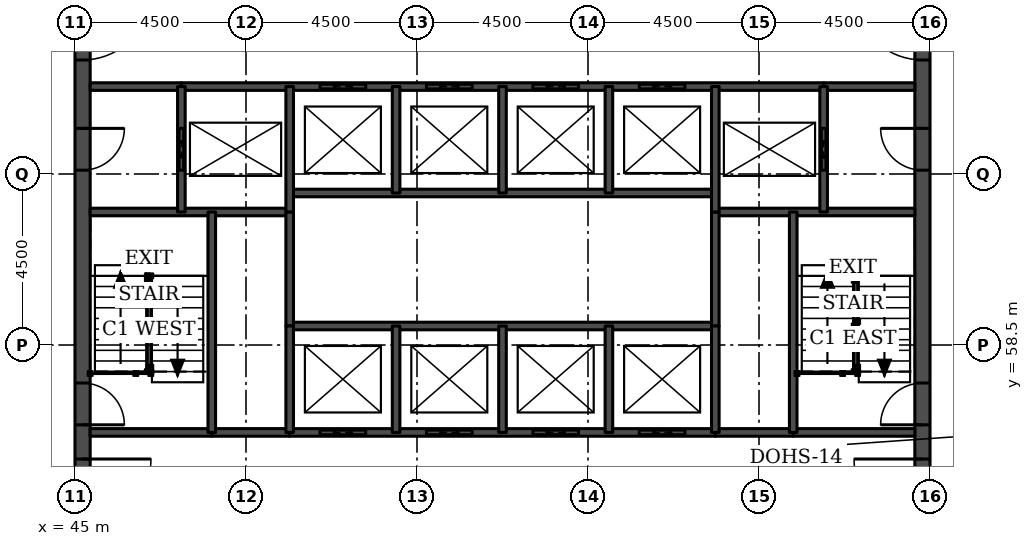
"""IFC4 building model, lengths in metres.
Left out: names, types, materials, properties, quantities, classifications, styles, units other than length and angle.
Written with IfcOpenShell. Run it as: python <this file> out.ifc"""

import sys

from ifc_helpers import new_model, si_unit, direction, frame, frame_2d, origin, place, context, subcontext, project, spatial, rectangle, extrude, element, fill, save


model = new_model("IFC4")
c1 = context("Model", 3, precision=1e-05, world=origin(), true_north=direction((0.0, 1.0)))
c2 = subcontext(c1, "Body", "Model", "MODEL_VIEW")
j1 = project(units=[si_unit("LENGTHUNIT", "METRE"), si_unit("PLANEANGLEUNIT", "RADIAN")], contexts=[c1])
p1 = place(None, origin())
s1 = spatial("IfcSite", under=j1, at=p1, CompositionType="ELEMENT")
p2 = place(p1, origin())
s2 = spatial("IfcBuilding", under=s1, at=p2, CompositionType="ELEMENT")
p3 = place(p2, frame((0.0, 0.0, 260.0)))
s3 = spatial("IfcBuildingStorey", under=s2, at=p3, CompositionType="ELEMENT", Elevation=260.0)
p4 = place(p3, frame((45.2, 49.5, 0.0), z_axis=(0.0, 0.0, 1.0), x_axis=(0.0, 1.0, 0.0)))
e1 = element("IfcWall", 1, at=p4, inside=s3, PredefinedType="SHEAR", context=c2, shape_type="SweptSolid", body=[
    extrude(rectangle(XDim=22.5, YDim=0.4, at=frame_2d((11.25, 0.0))), origin(), (0.0, 0.0, 1.0), 3.7),
])
p5 = place(p4, frame((4.2, 0.0, 0.0)))
e2 = element("IfcOpeningElement", 2, at=p5, cuts=e1, PredefinedType="OPENING", context=c2, shape_type="SweptSolid", body=[
    extrude(rectangle(XDim=1.8, YDim=2.1, at=frame_2d((0.9, 1.05))), frame((0.0, 0.21, 0.0), z_axis=(0.0, -1.0, 0.0), x_axis=(1.0, 0.0, 0.0)), (0.0, 0.0, 1.0), 0.42),
])
p6 = place(p4, frame((6.9, 0.0, 0.0)))
e3 = element("IfcOpeningElement", 3, at=p6, cuts=e1, PredefinedType="OPENING", context=c2, shape_type="SweptSolid", body=[
    extrude(rectangle(XDim=1.1, YDim=2.1, at=frame_2d((0.55, 1.05))), frame((0.0, 0.21, 0.0), z_axis=(0.0, -1.0, 0.0), x_axis=(1.0, 0.0, 0.0)), (0.0, 0.0, 1.0), 0.42),
])
p7 = place(p4, frame((13.6, 0.0, 0.0)))
e4 = element("IfcOpeningElement", 4, at=p7, cuts=e1, PredefinedType="OPENING", context=c2, shape_type="SweptSolid", body=[
    extrude(rectangle(XDim=1.1, YDim=2.1, at=frame_2d((0.55, 1.05))), frame((0.0, 0.21, 0.0), z_axis=(0.0, -1.0, 0.0), x_axis=(1.0, 0.0, 0.0)), (0.0, 0.0, 1.0), 0.42),
])
p8 = place(p4, frame((16.5, 0.0, 0.0)))
e5 = element("IfcOpeningElement", 5, at=p8, cuts=e1, PredefinedType="OPENING", context=c2, shape_type="SweptSolid", body=[
    extrude(rectangle(XDim=1.8, YDim=2.1, at=frame_2d((0.9, 1.05))), frame((0.0, 0.21, 0.0), z_axis=(0.0, -1.0, 0.0), x_axis=(1.0, 0.0, 0.0)), (0.0, 0.0, 1.0), 0.42),
])
p9 = place(p3, frame((67.3, 49.5, 0.0), z_axis=(0.0, 0.0, 1.0), x_axis=(0.0, 1.0, 0.0)))
e6 = element("IfcWall", 6, at=p9, inside=s3, PredefinedType="SHEAR", context=c2, shape_type="SweptSolid", body=[
    extrude(rectangle(XDim=22.5, YDim=0.4, at=frame_2d((11.25, 0.0))), origin(), (0.0, 0.0, 1.0), 3.7),
])
p10 = place(p9, frame((4.2, 0.0, 0.0)))
e7 = element("IfcOpeningElement", 7, at=p10, cuts=e6, PredefinedType="OPENING", context=c2, shape_type="SweptSolid", body=[
    extrude(rectangle(XDim=1.8, YDim=2.1, at=frame_2d((0.9, 1.05))), frame((0.0, 0.21, 0.0), z_axis=(0.0, -1.0, 0.0), x_axis=(1.0, 0.0, 0.0)), (0.0, 0.0, 1.0), 0.42),
])
p11 = place(p9, frame((6.9, 0.0, 0.0)))
e8 = element("IfcOpeningElement", 8, at=p11, cuts=e6, PredefinedType="OPENING", context=c2, shape_type="SweptSolid", body=[
    extrude(rectangle(XDim=1.1, YDim=2.1, at=frame_2d((0.55, 1.05))), frame((0.0, 0.21, 0.0), z_axis=(0.0, -1.0, 0.0), x_axis=(1.0, 0.0, 0.0)), (0.0, 0.0, 1.0), 0.42),
])
p12 = place(p9, frame((13.6, 0.0, 0.0)))
e9 = element("IfcOpeningElement", 9, at=p12, cuts=e6, PredefinedType="OPENING", context=c2, shape_type="SweptSolid", body=[
    extrude(rectangle(XDim=1.1, YDim=2.1, at=frame_2d((0.55, 1.05))), frame((0.0, 0.21, 0.0), z_axis=(0.0, -1.0, 0.0), x_axis=(1.0, 0.0, 0.0)), (0.0, 0.0, 1.0), 0.42),
])
p13 = place(p9, frame((16.5, 0.0, 0.0)))
e10 = element("IfcOpeningElement", 10, at=p13, cuts=e6, PredefinedType="OPENING", context=c2, shape_type="SweptSolid", body=[
    extrude(rectangle(XDim=1.8, YDim=2.1, at=frame_2d((0.9, 1.05))), frame((0.0, 0.21, 0.0), z_axis=(0.0, -1.0, 0.0), x_axis=(1.0, 0.0, 0.0)), (0.0, 0.0, 1.0), 0.42),
])
for number, where, z_axis, x_axis in (
    (11, (48.6, 56.2, 0.0), (0.0, 0.0, 1.0), (1.0, 0.0, 0.0)),
    (12, (61.85, 56.2, 0.0), (0.0, 0.0, 1.0), (1.0, 0.0, 0.0)),
):
    element("IfcWall", number, at=place(p3, frame(where, z_axis=z_axis, x_axis=x_axis)), inside=s3, PredefinedType="SOLIDWALL", context=c2, shape_type="SweptSolid", body=[
        extrude(rectangle(XDim=2.05, YDim=0.2, at=frame_2d((1.025, 0.0))), origin(), (0.0, 0.0, 1.0), 3.45),
    ])
p14 = place(p3, frame((45.4, 56.2, 0.0), z_axis=(0.0, 0.0, 1.0), x_axis=(1.0, 0.0, 0.0)))
e13 = element("IfcWall", 13, at=p14, inside=s3, PredefinedType="SOLIDWALL", context=c2, shape_type="SweptSolid", body=[
    extrude(rectangle(XDim=3.2, YDim=0.2, at=frame_2d((1.6, 0.0))), origin(), (0.0, 0.0, 1.0), 3.45),
])
p15 = place(p3, frame((50.65, 56.2, 0.0), z_axis=(0.0, 0.0, 1.0), x_axis=(1.0, 0.0, 0.0)))
e14 = element("IfcWall", 14, at=p15, inside=s3, PredefinedType="SOLIDWALL", context=c2, shape_type="SweptSolid", body=[
    extrude(rectangle(XDim=11.2, YDim=0.2, at=frame_2d((5.6, 0.0))), origin(), (0.0, 0.0, 1.0), 3.45),
])
p16 = place(p15, frame((0.8, 0.0, 0.0)))
e15 = element("IfcOpeningElement", 15, at=p16, cuts=e14, PredefinedType="OPENING", context=c2, shape_type="SweptSolid", body=[
    extrude(rectangle(XDim=1.2, YDim=2.1, at=frame_2d((0.6, 1.05))), frame((0.0, 0.11, 0.0), z_axis=(0.0, -1.0, 0.0), x_axis=(1.0, 0.0, 0.0)), (0.0, 0.0, 1.0), 0.22),
])
p17 = place(p15, frame((3.6, 0.0, 0.0)))
e16 = element("IfcOpeningElement", 16, at=p17, cuts=e14, PredefinedType="OPENING", context=c2, shape_type="SweptSolid", body=[
    extrude(rectangle(XDim=1.2, YDim=2.1, at=frame_2d((0.6, 1.05))), frame((0.0, 0.11, 0.0), z_axis=(0.0, -1.0, 0.0), x_axis=(1.0, 0.0, 0.0)), (0.0, 0.0, 1.0), 0.22),
])
p18 = place(p15, frame((6.4, 0.0, 0.0)))
e17 = element("IfcOpeningElement", 17, at=p18, cuts=e14, PredefinedType="OPENING", context=c2, shape_type="SweptSolid", body=[
    extrude(rectangle(XDim=1.2, YDim=2.1, at=frame_2d((0.6, 1.05))), frame((0.0, 0.11, 0.0), z_axis=(0.0, -1.0, 0.0), x_axis=(1.0, 0.0, 0.0)), (0.0, 0.0, 1.0), 0.22),
])
p19 = place(p15, frame((9.2, 0.0, 0.0)))
e18 = element("IfcOpeningElement", 18, at=p19, cuts=e14, PredefinedType="OPENING", context=c2, shape_type="SweptSolid", body=[
    extrude(rectangle(XDim=1.2, YDim=2.1, at=frame_2d((0.6, 1.05))), frame((0.0, 0.11, 0.0), z_axis=(0.0, -1.0, 0.0), x_axis=(1.0, 0.0, 0.0)), (0.0, 0.0, 1.0), 0.22),
])
p20 = place(p3, frame((63.9, 56.2, 0.0), z_axis=(0.0, 0.0, 1.0), x_axis=(1.0, 0.0, 0.0)))
e19 = element("IfcWall", 19, at=p20, inside=s3, PredefinedType="SOLIDWALL", context=c2, shape_type="SweptSolid", body=[
    extrude(rectangle(XDim=3.2, YDim=0.2, at=frame_2d((1.6, 0.0))), origin(), (0.0, 0.0, 1.0), 3.45),
])
p21 = place(p3, frame((50.65, 59.0, 0.0), z_axis=(0.0, 0.0, 1.0), x_axis=(1.0, 0.0, 0.0)))
e20 = element("IfcWall", 20, at=p21, inside=s3, PredefinedType="SOLIDWALL", context=c2, shape_type="SweptSolid", body=[
    extrude(rectangle(XDim=11.2, YDim=0.2, at=frame_2d((5.6, 0.0))), origin(), (0.0, 0.0, 1.0), 3.7),
])
for number, where, z_axis, x_axis in (
    (21, (45.4, 62.0, 0.0), (0.0, 0.0, 1.0), (1.0, 0.0, 0.0)),
    (22, (61.85, 62.0, 0.0), (0.0, 0.0, 1.0), (1.0, 0.0, 0.0)),
):
    element("IfcWall", number, at=place(p3, frame(where, z_axis=z_axis, x_axis=x_axis)), inside=s3, PredefinedType="SOLIDWALL", context=c2, shape_type="SweptSolid", body=[
        extrude(rectangle(XDim=5.25, YDim=0.2, at=frame_2d((2.625, 0.0))), origin(), (0.0, 0.0, 1.0), 3.45),
    ])
p22 = place(p3, frame((50.65, 62.5, 0.0), z_axis=(0.0, 0.0, 1.0), x_axis=(1.0, 0.0, 0.0)))
e23 = element("IfcWall", 23, at=p22, inside=s3, PredefinedType="SOLIDWALL", context=c2, shape_type="SweptSolid", body=[
    extrude(rectangle(XDim=11.2, YDim=0.2, at=frame_2d((5.6, 0.0))), origin(), (0.0, 0.0, 1.0), 3.7),
])
for number, where, z_axis, x_axis in (
    (24, (45.4, 65.3, 0.0), (0.0, 0.0, 1.0), (1.0, 0.0, 0.0)),
    (25, (64.7, 65.3, 0.0), (0.0, 0.0, 1.0), (1.0, 0.0, 0.0)),
):
    element("IfcWall", number, at=place(p3, frame(where, z_axis=z_axis, x_axis=x_axis)), inside=s3, PredefinedType="SOLIDWALL", context=c2, shape_type="SweptSolid", body=[
        extrude(rectangle(XDim=2.4, YDim=0.2, at=frame_2d((1.2, 0.0))), origin(), (0.0, 0.0, 1.0), 3.45),
    ])
p23 = place(p3, frame((47.8, 65.3, 0.0), z_axis=(0.0, 0.0, 1.0), x_axis=(1.0, 0.0, 0.0)))
e26 = element("IfcWall", 26, at=p23, inside=s3, PredefinedType="SOLIDWALL", context=c2, shape_type="SweptSolid", body=[
    extrude(rectangle(XDim=16.9, YDim=0.2, at=frame_2d((8.45, 0.0))), origin(), (0.0, 0.0, 1.0), 3.45),
])
p24 = place(p23, frame((3.65, 0.0, 0.0)))
e27 = element("IfcOpeningElement", 27, at=p24, cuts=e26, PredefinedType="OPENING", context=c2, shape_type="SweptSolid", body=[
    extrude(rectangle(XDim=1.2, YDim=2.1, at=frame_2d((0.6, 1.05))), frame((0.0, 0.11, 0.0), z_axis=(0.0, -1.0, 0.0), x_axis=(1.0, 0.0, 0.0)), (0.0, 0.0, 1.0), 0.22),
])
p25 = place(p23, frame((6.45, 0.0, 0.0)))
e28 = element("IfcOpeningElement", 28, at=p25, cuts=e26, PredefinedType="OPENING", context=c2, shape_type="SweptSolid", body=[
    extrude(rectangle(XDim=1.2, YDim=2.1, at=frame_2d((0.6, 1.05))), frame((0.0, 0.11, 0.0), z_axis=(0.0, -1.0, 0.0), x_axis=(1.0, 0.0, 0.0)), (0.0, 0.0, 1.0), 0.22),
])
p26 = place(p23, frame((9.25, 0.0, 0.0)))
e29 = element("IfcOpeningElement", 29, at=p26, cuts=e26, PredefinedType="OPENING", context=c2, shape_type="SweptSolid", body=[
    extrude(rectangle(XDim=1.2, YDim=2.1, at=frame_2d((0.6, 1.05))), frame((0.0, 0.11, 0.0), z_axis=(0.0, -1.0, 0.0), x_axis=(1.0, 0.0, 0.0)), (0.0, 0.0, 1.0), 0.22),
])
p27 = place(p23, frame((12.05, 0.0, 0.0)))
e30 = element("IfcOpeningElement", 30, at=p27, cuts=e26, PredefinedType="OPENING", context=c2, shape_type="SweptSolid", body=[
    extrude(rectangle(XDim=1.2, YDim=2.1, at=frame_2d((0.6, 1.05))), frame((0.0, 0.11, 0.0), z_axis=(0.0, -1.0, 0.0), x_axis=(1.0, 0.0, 0.0)), (0.0, 0.0, 1.0), 0.22),
])
p28 = place(p3, frame((47.8, 62.0, 0.0), z_axis=(0.0, 0.0, 1.0), x_axis=(0.0, 1.0, 0.0)))
e31 = element("IfcWall", 31, at=p28, inside=s3, PredefinedType="SOLIDWALL", context=c2, shape_type="SweptSolid", body=[
    extrude(rectangle(XDim=3.3, YDim=0.2, at=frame_2d((1.65, 0.0))), origin(), (0.0, 0.0, 1.0), 3.45),
])
p29 = place(p28, frame((1.1, 0.0, 0.0)))
e32 = element("IfcOpeningElement", 32, at=p29, cuts=e31, PredefinedType="OPENING", context=c2, shape_type="SweptSolid", body=[
    extrude(rectangle(XDim=1.1, YDim=2.1, at=frame_2d((0.55, 1.05))), frame((0.0, 0.11, 0.0), z_axis=(0.0, -1.0, 0.0), x_axis=(1.0, 0.0, 0.0)), (0.0, 0.0, 1.0), 0.22),
])
p30 = place(p3, frame((48.6, 56.2, 0.0), z_axis=(0.0, 0.0, 1.0), x_axis=(0.0, 1.0, 0.0)))
e33 = element("IfcWall", 33, at=p30, inside=s3, PredefinedType="SOLIDWALL", context=c2, shape_type="SweptSolid", body=[
    extrude(rectangle(XDim=5.8, YDim=0.2, at=frame_2d((2.9, 0.0))), origin(), (0.0, 0.0, 1.0), 3.45),
])
p31 = place(p3, frame((50.65, 59.0, 0.0), z_axis=(0.0, 0.0, 1.0), x_axis=(0.0, 1.0, 0.0)))
e34 = element("IfcWall", 34, at=p31, inside=s3, PredefinedType="SOLIDWALL", context=c2, shape_type="SweptSolid", body=[
    extrude(rectangle(XDim=3.0, YDim=0.2, at=frame_2d((1.5, 0.0))), origin(), (0.0, 0.0, 1.0), 3.7),
])
p32 = place(p3, frame((50.65, 56.2, 0.0), z_axis=(0.0, 0.0, 1.0), x_axis=(0.0, 1.0, 0.0)))
e35 = element("IfcWall", 35, at=p32, inside=s3, PredefinedType="SOLIDWALL", context=c2, shape_type="SweptSolid", body=[
    extrude(rectangle(XDim=2.8, YDim=0.2, at=frame_2d((1.4, 0.0))), origin(), (0.0, 0.0, 1.0), 3.45),
])
p33 = place(p3, frame((50.65, 62.0, 0.0), z_axis=(0.0, 0.0, 1.0), x_axis=(0.0, 1.0, 0.0)))
e36 = element("IfcWall", 36, at=p33, inside=s3, PredefinedType="SOLIDWALL", context=c2, shape_type="SweptSolid", body=[
    extrude(rectangle(XDim=3.3, YDim=0.2, at=frame_2d((1.65, 0.0))), origin(), (0.0, 0.0, 1.0), 3.45),
])
for number, where, z_axis, x_axis in (
    (37, (53.45, 56.2, 0.0), (0.0, 0.0, 1.0), (0.0, 1.0, 0.0)),
    (38, (53.45, 62.5, 0.0), (0.0, 0.0, 1.0), (0.0, 1.0, 0.0)),
    (39, (56.25, 56.2, 0.0), (0.0, 0.0, 1.0), (0.0, 1.0, 0.0)),
    (40, (56.25, 62.5, 0.0), (0.0, 0.0, 1.0), (0.0, 1.0, 0.0)),
    (41, (59.05, 56.2, 0.0), (0.0, 0.0, 1.0), (0.0, 1.0, 0.0)),
    (42, (59.05, 62.5, 0.0), (0.0, 0.0, 1.0), (0.0, 1.0, 0.0)),
):
    element("IfcWall", number, at=place(p3, frame(where, z_axis=z_axis, x_axis=x_axis)), inside=s3, PredefinedType="SOLIDWALL", context=c2, shape_type="SweptSolid", body=[
        extrude(rectangle(XDim=2.8, YDim=0.2, at=frame_2d((1.4, 0.0))), origin(), (0.0, 0.0, 1.0), 3.45),
    ])
p34 = place(p3, frame((61.85, 59.0, 0.0), z_axis=(0.0, 0.0, 1.0), x_axis=(0.0, 1.0, 0.0)))
e43 = element("IfcWall", 43, at=p34, inside=s3, PredefinedType="SOLIDWALL", context=c2, shape_type="SweptSolid", body=[
    extrude(rectangle(XDim=3.0, YDim=0.2, at=frame_2d((1.5, 0.0))), origin(), (0.0, 0.0, 1.0), 3.7),
])
p35 = place(p3, frame((61.85, 56.2, 0.0), z_axis=(0.0, 0.0, 1.0), x_axis=(0.0, 1.0, 0.0)))
e44 = element("IfcWall", 44, at=p35, inside=s3, PredefinedType="SOLIDWALL", context=c2, shape_type="SweptSolid", body=[
    extrude(rectangle(XDim=2.8, YDim=0.2, at=frame_2d((1.4, 0.0))), origin(), (0.0, 0.0, 1.0), 3.45),
])
p36 = place(p3, frame((61.85, 62.0, 0.0), z_axis=(0.0, 0.0, 1.0), x_axis=(0.0, 1.0, 0.0)))
e45 = element("IfcWall", 45, at=p36, inside=s3, PredefinedType="SOLIDWALL", context=c2, shape_type="SweptSolid", body=[
    extrude(rectangle(XDim=3.3, YDim=0.2, at=frame_2d((1.65, 0.0))), origin(), (0.0, 0.0, 1.0), 3.45),
])
p37 = place(p3, frame((63.9, 56.2, 0.0), z_axis=(0.0, 0.0, 1.0), x_axis=(0.0, 1.0, 0.0)))
e46 = element("IfcWall", 46, at=p37, inside=s3, PredefinedType="SOLIDWALL", context=c2, shape_type="SweptSolid", body=[
    extrude(rectangle(XDim=5.8, YDim=0.2, at=frame_2d((2.9, 0.0))), origin(), (0.0, 0.0, 1.0), 3.45),
])
p38 = place(p3, frame((64.7, 62.0, 0.0), z_axis=(0.0, 0.0, 1.0), x_axis=(0.0, 1.0, 0.0)))
e47 = element("IfcWall", 47, at=p38, inside=s3, PredefinedType="SOLIDWALL", context=c2, shape_type="SweptSolid", body=[
    extrude(rectangle(XDim=3.3, YDim=0.2, at=frame_2d((1.65, 0.0))), origin(), (0.0, 0.0, 1.0), 3.45),
])
p39 = place(p38, frame((1.1, 0.0, 0.0)))
e48 = element("IfcOpeningElement", 48, at=p39, cuts=e47, PredefinedType="OPENING", context=c2, shape_type="SweptSolid", body=[
    extrude(rectangle(XDim=1.1, YDim=2.1, at=frame_2d((0.55, 1.05))), frame((0.0, 0.11, 0.0), z_axis=(0.0, -1.0, 0.0), x_axis=(1.0, 0.0, 0.0)), (0.0, 0.0, 1.0), 0.22),
])
p40 = place(p16, origin())
e49 = element("IfcDoor", 49, at=p40, inside=s3, OperationType="DOUBLE_DOOR_SLIDING", PredefinedType="DOOR", context=c2, shape_type="SweptSolid", body=[
    extrude(rectangle(XDim=1.2, YDim=2.1, at=frame_2d((0.6, 1.05))), frame((0.0, 0.025, 0.0), z_axis=(0.0, -1.0, 0.0), x_axis=(1.0, 0.0, 0.0)), (0.0, 0.0, 1.0), 0.05),
])
fill(e15, e49)
p41 = place(p17, origin())
e50 = element("IfcDoor", 50, at=p41, inside=s3, OperationType="DOUBLE_DOOR_SLIDING", PredefinedType="DOOR", context=c2, shape_type="SweptSolid", body=[
    extrude(rectangle(XDim=1.2, YDim=2.1, at=frame_2d((0.6, 1.05))), frame((0.0, 0.025, 0.0), z_axis=(0.0, -1.0, 0.0), x_axis=(1.0, 0.0, 0.0)), (0.0, 0.0, 1.0), 0.05),
])
fill(e16, e50)
p42 = place(p18, origin())
e51 = element("IfcDoor", 51, at=p42, inside=s3, OperationType="DOUBLE_DOOR_SLIDING", PredefinedType="DOOR", context=c2, shape_type="SweptSolid", body=[
    extrude(rectangle(XDim=1.2, YDim=2.1, at=frame_2d((0.6, 1.05))), frame((0.0, 0.025, 0.0), z_axis=(0.0, -1.0, 0.0), x_axis=(1.0, 0.0, 0.0)), (0.0, 0.0, 1.0), 0.05),
])
fill(e17, e51)
p43 = place(p19, origin())
e52 = element("IfcDoor", 52, at=p43, inside=s3, OperationType="DOUBLE_DOOR_SLIDING", PredefinedType="DOOR", context=c2, shape_type="SweptSolid", body=[
    extrude(rectangle(XDim=1.2, YDim=2.1, at=frame_2d((0.6, 1.05))), frame((0.0, 0.025, 0.0), z_axis=(0.0, -1.0, 0.0), x_axis=(1.0, 0.0, 0.0)), (0.0, 0.0, 1.0), 0.05),
])
fill(e18, e52)
p44 = place(p24, origin())
e53 = element("IfcDoor", 53, at=p44, inside=s3, OperationType="DOUBLE_DOOR_SLIDING", PredefinedType="DOOR", context=c2, shape_type="SweptSolid", body=[
    extrude(rectangle(XDim=1.2, YDim=2.1, at=frame_2d((0.6, 1.05))), frame((0.0, 0.025, 0.0), z_axis=(0.0, -1.0, 0.0), x_axis=(1.0, 0.0, 0.0)), (0.0, 0.0, 1.0), 0.05),
])
fill(e27, e53)
p45 = place(p25, origin())
e54 = element("IfcDoor", 54, at=p45, inside=s3, OperationType="DOUBLE_DOOR_SLIDING", PredefinedType="DOOR", context=c2, shape_type="SweptSolid", body=[
    extrude(rectangle(XDim=1.2, YDim=2.1, at=frame_2d((0.6, 1.05))), frame((0.0, 0.025, 0.0), z_axis=(0.0, -1.0, 0.0), x_axis=(1.0, 0.0, 0.0)), (0.0, 0.0, 1.0), 0.05),
])
fill(e28, e54)
p46 = place(p26, origin())
e55 = element("IfcDoor", 55, at=p46, inside=s3, OperationType="DOUBLE_DOOR_SLIDING", PredefinedType="DOOR", context=c2, shape_type="SweptSolid", body=[
    extrude(rectangle(XDim=1.2, YDim=2.1, at=frame_2d((0.6, 1.05))), frame((0.0, 0.025, 0.0), z_axis=(0.0, -1.0, 0.0), x_axis=(1.0, 0.0, 0.0)), (0.0, 0.0, 1.0), 0.05),
])
fill(e29, e55)
p47 = place(p27, origin())
e56 = element("IfcDoor", 56, at=p47, inside=s3, OperationType="DOUBLE_DOOR_SLIDING", PredefinedType="DOOR", context=c2, shape_type="SweptSolid", body=[
    extrude(rectangle(XDim=1.2, YDim=2.1, at=frame_2d((0.6, 1.05))), frame((0.0, 0.025, 0.0), z_axis=(0.0, -1.0, 0.0), x_axis=(1.0, 0.0, 0.0)), (0.0, 0.0, 1.0), 0.05),
])
fill(e30, e56)
p48 = place(p29, origin())
e57 = element("IfcDoor", 57, at=p48, inside=s3, OperationType="DOUBLE_DOOR_SLIDING", PredefinedType="DOOR", context=c2, shape_type="SweptSolid", body=[
    extrude(rectangle(XDim=1.1, YDim=2.1, at=frame_2d((0.55, 1.05))), frame((0.0, 0.025, 0.0), z_axis=(0.0, -1.0, 0.0), x_axis=(1.0, 0.0, 0.0)), (0.0, 0.0, 1.0), 0.05),
])
fill(e32, e57)
p49 = place(p39, origin())
e58 = element("IfcDoor", 58, at=p49, inside=s3, OperationType="DOUBLE_DOOR_SLIDING", PredefinedType="DOOR", context=c2, shape_type="SweptSolid", body=[
    extrude(rectangle(XDim=1.1, YDim=2.1, at=frame_2d((0.55, 1.05))), frame((0.0, 0.025, 0.0), z_axis=(0.0, -1.0, 0.0), x_axis=(1.0, 0.0, 0.0)), (0.0, 0.0, 1.0), 0.05),
])
fill(e48, e58)
p50 = place(p5, frame((1.8, 0.0, 0.0), z_axis=(0.0, 0.0, 1.0), x_axis=(-1.0, 0.0, 0.0)))
e59 = element("IfcDoor", 59, at=p50, inside=s3, OperationType="SINGLE_SWING_LEFT", PredefinedType="DOOR", context=c2, shape_type="SweptSolid", body=[
    extrude(rectangle(XDim=1.8, YDim=2.1, at=frame_2d((0.9, 1.05))), frame((0.0, 0.025, 0.0), z_axis=(0.0, -1.0, 0.0), x_axis=(1.0, 0.0, 0.0)), (0.0, 0.0, 1.0), 0.05),
])
fill(e2, e59)
p51 = place(p6, frame((1.1, 0.0, 0.0), z_axis=(0.0, 0.0, 1.0), x_axis=(-1.0, 0.0, 0.0)))
e60 = element("IfcDoor", 60, at=p51, inside=s3, OperationType="SINGLE_SWING_RIGHT", PredefinedType="DOOR", context=c2, shape_type="SweptSolid", body=[
    extrude(rectangle(XDim=1.1, YDim=2.1, at=frame_2d((0.55, 1.05))), frame((0.0, 0.025, 0.0), z_axis=(0.0, -1.0, 0.0), x_axis=(1.0, 0.0, 0.0)), (0.0, 0.0, 1.0), 0.05),
])
fill(e3, e60)
p52 = place(p7, frame((1.1, 0.0, 0.0), z_axis=(0.0, 0.0, 1.0), x_axis=(-1.0, 0.0, 0.0)))
e61 = element("IfcDoor", 61, at=p52, inside=s3, OperationType="SINGLE_SWING_LEFT", PredefinedType="DOOR", context=c2, shape_type="SweptSolid", body=[
    extrude(rectangle(XDim=1.1, YDim=2.1, at=frame_2d((0.55, 1.05))), frame((0.0, 0.025, 0.0), z_axis=(0.0, -1.0, 0.0), x_axis=(1.0, 0.0, 0.0)), (0.0, 0.0, 1.0), 0.05),
])
fill(e4, e61)
p53 = place(p8, frame((1.8, 0.0, 0.0), z_axis=(0.0, 0.0, 1.0), x_axis=(-1.0, 0.0, 0.0)))
e62 = element("IfcDoor", 62, at=p53, inside=s3, OperationType="SINGLE_SWING_LEFT", PredefinedType="DOOR", context=c2, shape_type="SweptSolid", body=[
    extrude(rectangle(XDim=1.8, YDim=2.1, at=frame_2d((0.9, 1.05))), frame((0.0, 0.025, 0.0), z_axis=(0.0, -1.0, 0.0), x_axis=(1.0, 0.0, 0.0)), (0.0, 0.0, 1.0), 0.05),
])
fill(e5, e62)
p54 = place(p10, origin())
e63 = element("IfcDoor", 63, at=p54, inside=s3, OperationType="SINGLE_SWING_RIGHT", PredefinedType="DOOR", context=c2, shape_type="SweptSolid", body=[
    extrude(rectangle(XDim=1.8, YDim=2.1, at=frame_2d((0.9, 1.05))), frame((0.0, 0.025, 0.0), z_axis=(0.0, -1.0, 0.0), x_axis=(1.0, 0.0, 0.0)), (0.0, 0.0, 1.0), 0.05),
])
fill(e7, e63)
p55 = place(p11, origin())
e64 = element("IfcDoor", 64, at=p55, inside=s3, OperationType="SINGLE_SWING_LEFT", PredefinedType="DOOR", context=c2, shape_type="SweptSolid", body=[
    extrude(rectangle(XDim=1.1, YDim=2.1, at=frame_2d((0.55, 1.05))), frame((0.0, 0.025, 0.0), z_axis=(0.0, -1.0, 0.0), x_axis=(1.0, 0.0, 0.0)), (0.0, 0.0, 1.0), 0.05),
])
fill(e8, e64)
p56 = place(p12, origin())
e65 = element("IfcDoor", 65, at=p56, inside=s3, OperationType="SINGLE_SWING_RIGHT", PredefinedType="DOOR", context=c2, shape_type="SweptSolid", body=[
    extrude(rectangle(XDim=1.1, YDim=2.1, at=frame_2d((0.55, 1.05))), frame((0.0, 0.025, 0.0), z_axis=(0.0, -1.0, 0.0), x_axis=(1.0, 0.0, 0.0)), (0.0, 0.0, 1.0), 0.05),
])
fill(e9, e65)
p57 = place(p13, origin())
e66 = element("IfcDoor", 66, at=p57, inside=s3, OperationType="SINGLE_SWING_RIGHT", PredefinedType="DOOR", context=c2, shape_type="SweptSolid", body=[
    extrude(rectangle(XDim=1.8, YDim=2.1, at=frame_2d((0.9, 1.05))), frame((0.0, 0.025, 0.0), z_axis=(0.0, -1.0, 0.0), x_axis=(1.0, 0.0, 0.0)), (0.0, 0.0, 1.0), 0.05),
])
fill(e10, e66)
save(model, sys.argv[1])
